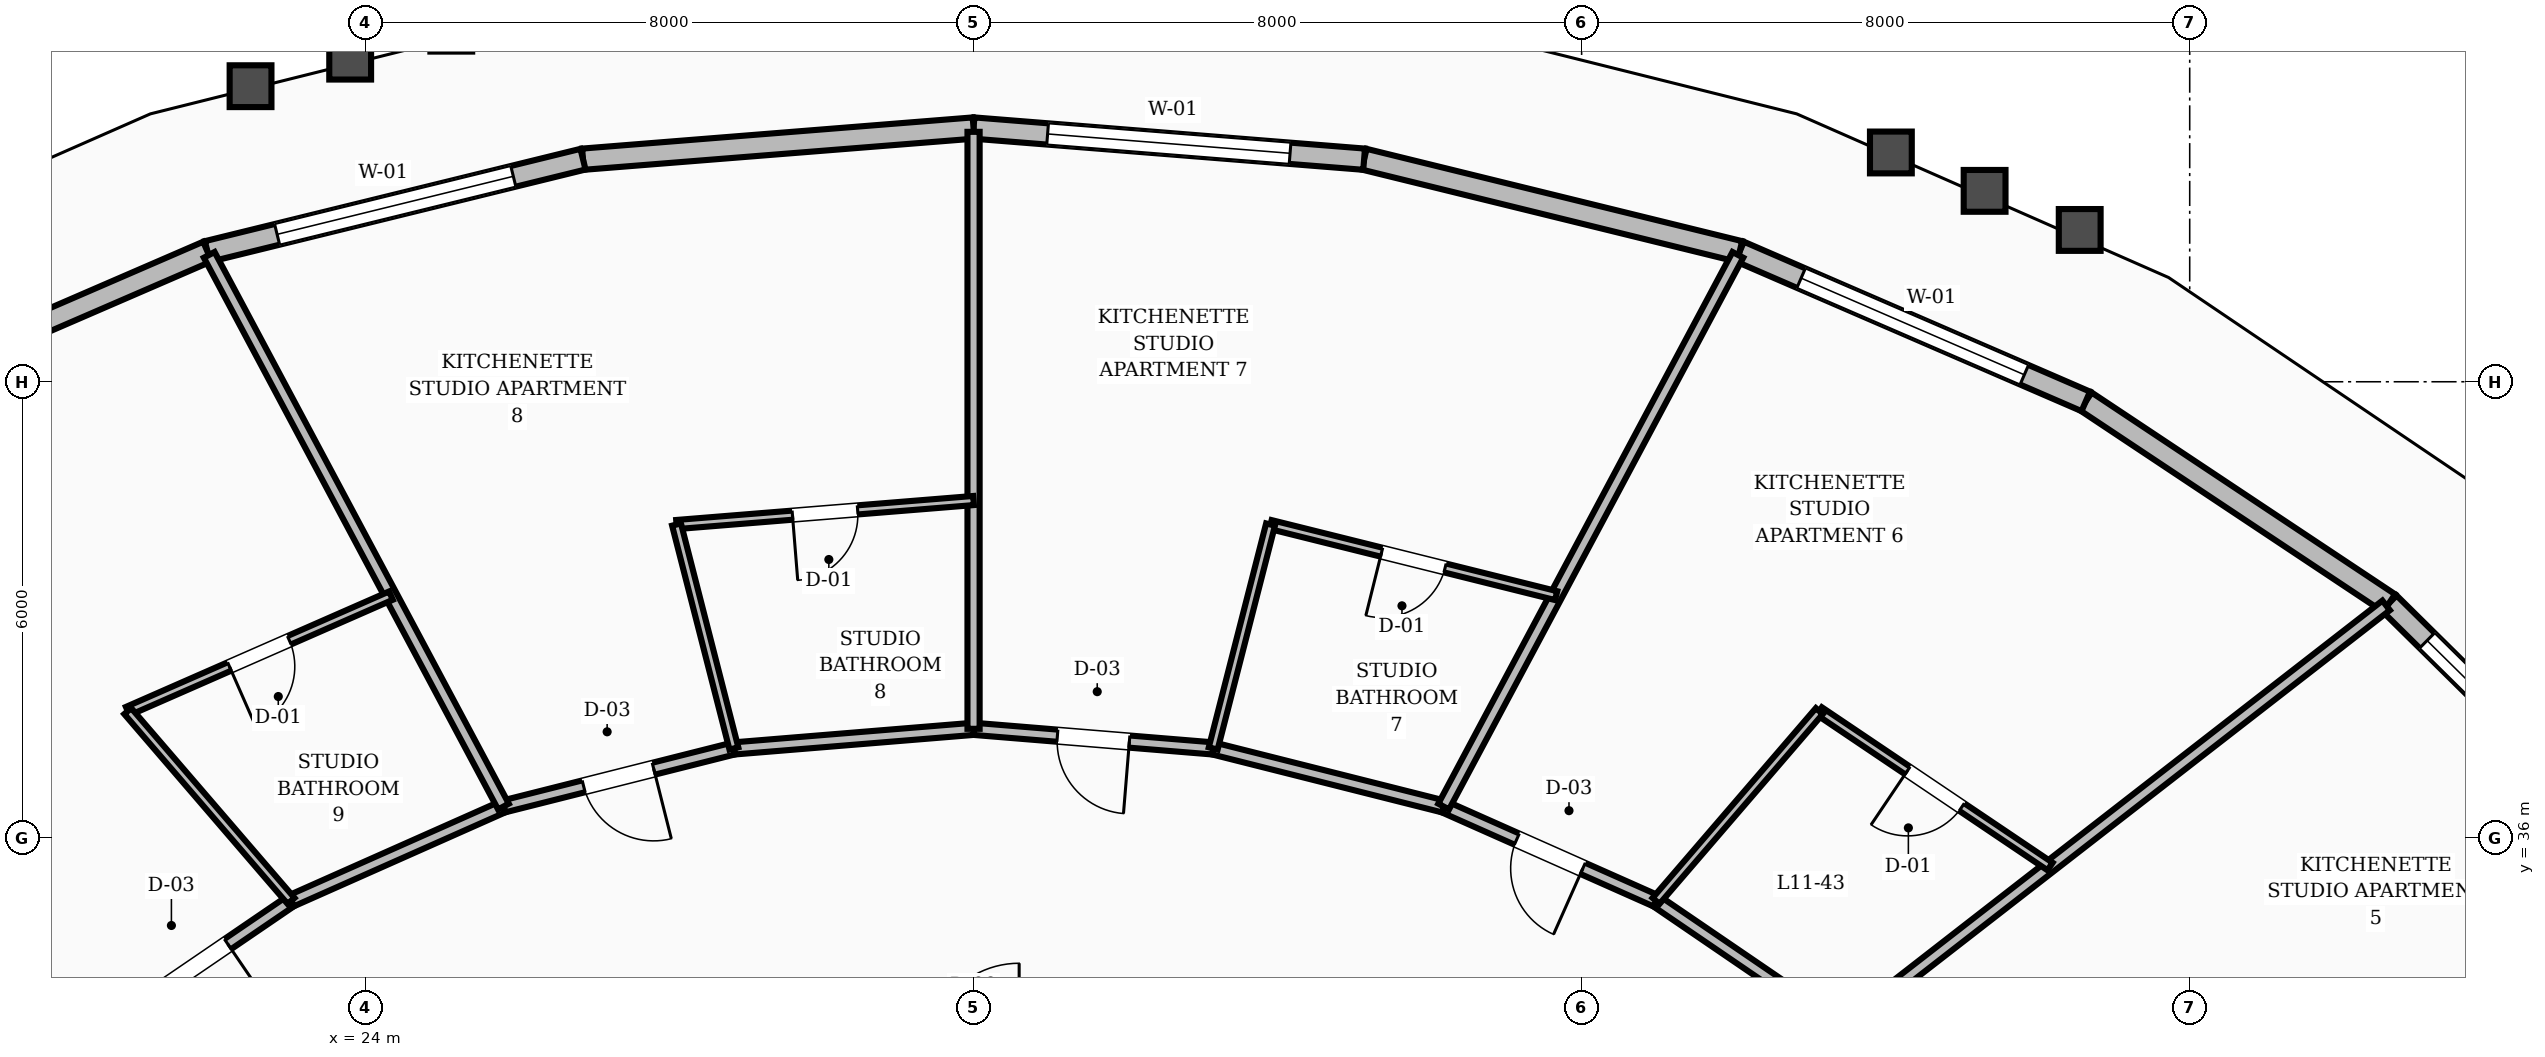
"""IFC4 building model, lengths in metres.
Left out: names, types, materials, properties, quantities, classifications, styles, units other than length and angle.
Written with IfcOpenShell. Run it as: python <this file> out.ifc"""

import sys

from ifc_helpers import new_model, si_unit, direction, frame, frame_2d, origin, place, context, subcontext, project, spatial, rectangle, extrude, element, fill, save


model = new_model("IFC4")
c1 = context("Model", 3, precision=1e-05, world=origin(), true_north=direction((0.0, 1.0)))
c2 = subcontext(c1, "Body", "Model", "MODEL_VIEW")
j1 = project(units=[si_unit("LENGTHUNIT", "METRE"), si_unit("PLANEANGLEUNIT", "RADIAN")], contexts=[c1])
p1 = place(None, origin())
s1 = spatial("IfcSite", under=j1, at=p1, CompositionType="ELEMENT")
p2 = place(p1, origin())
s2 = spatial("IfcBuilding", under=s1, at=p2, CompositionType="ELEMENT")
p3 = place(p2, frame((0.0, 0.0, 48.4)))
s3 = spatial("IfcBuildingStorey", under=s2, at=p3, CompositionType="ELEMENT", Elevation=48.4)
p4 = place(p3, frame((53.899, 35.855, 0.0), z_axis=(0.0, 0.0, 1.0), x_axis=(-0.711653949878, 0.70253018129, 0.0)))
e1 = element("IfcWall", 1, at=p4, inside=s3, PredefinedType="STANDARD", context=c2, shape_type="SweptSolid", body=[
    extrude(rectangle(XDim=4.603, YDim=0.28, at=frame_2d((2.301, 0.0))), origin(), (0.0, 0.0, 1.0), 2.65),
])
p5 = place(p4, frame((0.701, 0.0, 0.8)))
e2 = element("IfcOpeningElement", 2, at=p5, cuts=e1, PredefinedType="OPENING", context=c2, shape_type="SweptSolid", body=[
    extrude(rectangle(XDim=3.2, YDim=1.65, at=frame_2d((1.6, 0.825))), frame((0.0, 0.15, 0.0), z_axis=(0.0, -1.0, 0.0), x_axis=(1.0, 0.0, 0.0)), (0.0, 0.0, 1.0), 0.3),
])
p6 = place(p3, frame((50.624, 39.088, 0.0), z_axis=(0.0, 0.0, 1.0), x_axis=(-0.832723620408, 0.55368887655, 0.0)))
e3 = element("IfcWall", 3, at=p6, inside=s3, PredefinedType="STANDARD", context=c2, shape_type="SweptSolid", body=[
    extrude(rectangle(XDim=4.793, YDim=0.28, at=frame_2d((2.396, 0.0))), origin(), (0.0, 0.0, 1.0), 2.65),
])
p7 = place(p3, frame((46.633, 41.742, 0.0), z_axis=(0.0, 0.0, 1.0), x_axis=(-0.917665086661, 0.397354739149, 0.0)))
e4 = element("IfcWall", 4, at=p7, inside=s3, PredefinedType="STANDARD", context=c2, shape_type="SweptSolid", body=[
    extrude(rectangle(XDim=4.962, YDim=0.28, at=frame_2d((2.481, 0.0))), origin(), (0.0, 0.0, 1.0), 2.65),
])
p8 = place(p7, frame((0.881, 0.0, 0.8)))
e5 = element("IfcOpeningElement", 5, at=p8, cuts=e4, PredefinedType="OPENING", context=c2, shape_type="SweptSolid", body=[
    extrude(rectangle(XDim=3.2, YDim=1.65, at=frame_2d((1.6, 0.825))), frame((0.0, 0.15, 0.0), z_axis=(0.0, -1.0, 0.0), x_axis=(1.0, 0.0, 0.0)), (0.0, 0.0, 1.0), 0.3),
])
p9 = place(p3, frame((42.079, 43.714, 0.0), z_axis=(0.0, 0.0, 1.0), x_axis=(-0.971100140987, 0.238672403462, 0.0)))
e6 = element("IfcWall", 6, at=p9, inside=s3, PredefinedType="STANDARD", context=c2, shape_type="SweptSolid", body=[
    extrude(rectangle(XDim=5.088, YDim=0.28, at=frame_2d((2.544, 0.0))), origin(), (0.0, 0.0, 1.0), 2.65),
])
p10 = place(p3, frame((37.138, 44.928, 0.0), z_axis=(0.0, 0.0, 1.0), x_axis=(-0.996832874693, 0.079524964203, 0.0)))
e7 = element("IfcWall", 7, at=p10, inside=s3, PredefinedType="STANDARD", context=c2, shape_type="SweptSolid", body=[
    extrude(rectangle(XDim=5.155, YDim=0.28, at=frame_2d((2.577, 0.0))), origin(), (0.0, 0.0, 1.0), 2.65),
])
p11 = place(p10, frame((0.977, 0.0, 0.8)))
e8 = element("IfcOpeningElement", 8, at=p11, cuts=e7, PredefinedType="OPENING", context=c2, shape_type="SweptSolid", body=[
    extrude(rectangle(XDim=3.2, YDim=1.65, at=frame_2d((1.6, 0.825))), frame((0.0, 0.15, 0.0), z_axis=(0.0, -1.0, 0.0), x_axis=(1.0, 0.0, 0.0)), (0.0, 0.0, 1.0), 0.3),
])
p12 = place(p3, frame((32.0, 45.338, 0.0), z_axis=(0.0, 0.0, 1.0), x_axis=(-0.996832874693, -0.079524964203, 0.0)))
e9 = element("IfcWall", 9, at=p12, inside=s3, PredefinedType="STANDARD", context=c2, shape_type="SweptSolid", body=[
    extrude(rectangle(XDim=5.155, YDim=0.28, at=frame_2d((2.577, 0.0))), origin(), (0.0, 0.0, 1.0), 2.65),
])
p13 = place(p3, frame((26.862, 44.928, 0.0), z_axis=(0.0, 0.0, 1.0), x_axis=(-0.971100140987, -0.238672403462, 0.0)))
e10 = element("IfcWall", 10, at=p13, inside=s3, PredefinedType="STANDARD", context=c2, shape_type="SweptSolid", body=[
    extrude(rectangle(XDim=5.088, YDim=0.28, at=frame_2d((2.544, 0.0))), origin(), (0.0, 0.0, 1.0), 2.65),
])
p14 = place(p13, frame((0.944, 0.0, 0.8)))
e11 = element("IfcOpeningElement", 11, at=p14, cuts=e10, PredefinedType="OPENING", context=c2, shape_type="SweptSolid", body=[
    extrude(rectangle(XDim=3.2, YDim=1.65, at=frame_2d((1.6, 0.825))), frame((0.0, 0.15, 0.0), z_axis=(0.0, -1.0, 0.0), x_axis=(1.0, 0.0, 0.0)), (0.0, 0.0, 1.0), 0.3),
])
p15 = place(p3, frame((21.921, 43.714, 0.0), z_axis=(0.0, 0.0, 1.0), x_axis=(-0.917665086661, -0.397354739149, 0.0)))
e12 = element("IfcWall", 12, at=p15, inside=s3, PredefinedType="STANDARD", context=c2, shape_type="SweptSolid", body=[
    extrude(rectangle(XDim=4.962, YDim=0.28, at=frame_2d((2.481, 0.0))), origin(), (0.0, 0.0, 1.0), 2.65),
])
p16 = place(p3, frame((43.428, 33.499, 0.0), z_axis=(0.0, 0.0, 1.0), x_axis=(-0.826112340767, 0.563505457323, 0.0)))
e13 = element("IfcWall", 13, at=p16, inside=s3, PredefinedType="SOLIDWALL", context=c2, shape_type="SweptSolid", body=[
    extrude(rectangle(XDim=2.965, YDim=0.16, at=frame_2d((1.482, 0.0))), origin(), (0.0, 0.0, 1.0), 2.61),
])
p17 = place(p3, frame((40.979, 35.17, 0.0), z_axis=(0.0, 0.0, 1.0), x_axis=(-0.913860932409, 0.406027334321, 0.0)))
e14 = element("IfcWall", 14, at=p17, inside=s3, PredefinedType="SOLIDWALL", context=c2, shape_type="SweptSolid", body=[
    extrude(rectangle(XDim=3.058, YDim=0.16, at=frame_2d((1.529, 0.0))), origin(), (0.0, 0.0, 1.0), 2.61),
])
p18 = place(p17, frame((1.054, 0.0, 0.0)))
e15 = element("IfcOpeningElement", 15, at=p18, cuts=e14, PredefinedType="OPENING", context=c2, shape_type="SweptSolid", body=[
    extrude(rectangle(XDim=0.95, YDim=2.1, at=frame_2d((0.475, 1.05))), frame((0.0, 0.09, 0.0), z_axis=(0.0, -1.0, 0.0), x_axis=(1.0, 0.0, 0.0)), (0.0, 0.0, 1.0), 0.18),
])
p19 = place(p3, frame((38.185, 36.411, 0.0), z_axis=(0.0, 0.0, 1.0), x_axis=(-0.969653665365, 0.244482656326, 0.0)))
e16 = element("IfcWall", 16, at=p19, inside=s3, PredefinedType="SOLIDWALL", context=c2, shape_type="SweptSolid", body=[
    extrude(rectangle(XDim=3.127, YDim=0.16, at=frame_2d((1.563, 0.0))), origin(), (0.0, 0.0, 1.0), 2.61),
])
p20 = place(p3, frame((35.153, 37.176, 0.0), z_axis=(0.0, 0.0, 1.0), x_axis=(-0.996661331307, 0.081646743207, 0.0)))
e17 = element("IfcWall", 17, at=p20, inside=s3, PredefinedType="SOLIDWALL", context=c2, shape_type="SweptSolid", body=[
    extrude(rectangle(XDim=3.164, YDim=0.16, at=frame_2d((1.582, 0.0))), origin(), (0.0, 0.0, 1.0), 2.61),
])
p21 = place(p20, frame((1.107, 0.0, 0.0)))
e18 = element("IfcOpeningElement", 18, at=p21, cuts=e17, PredefinedType="OPENING", context=c2, shape_type="SweptSolid", body=[
    extrude(rectangle(XDim=0.95, YDim=2.1, at=frame_2d((0.475, 1.05))), frame((0.0, 0.09, 0.0), z_axis=(0.0, -1.0, 0.0), x_axis=(1.0, 0.0, 0.0)), (0.0, 0.0, 1.0), 0.18),
])
p22 = place(p3, frame((32.0, 37.434, 0.0), z_axis=(0.0, 0.0, 1.0), x_axis=(-0.996661331307, -0.081646743207, 0.0)))
e19 = element("IfcWall", 19, at=p22, inside=s3, PredefinedType="SOLIDWALL", context=c2, shape_type="SweptSolid", body=[
    extrude(rectangle(XDim=3.164, YDim=0.16, at=frame_2d((1.582, 0.0))), origin(), (0.0, 0.0, 1.0), 2.61),
])
p23 = place(p3, frame((28.847, 37.176, 0.0), z_axis=(0.0, 0.0, 1.0), x_axis=(-0.969653665365, -0.244482656326, 0.0)))
e20 = element("IfcWall", 20, at=p23, inside=s3, PredefinedType="SOLIDWALL", context=c2, shape_type="SweptSolid", body=[
    extrude(rectangle(XDim=3.127, YDim=0.16, at=frame_2d((1.563, 0.0))), origin(), (0.0, 0.0, 1.0), 2.61),
])
p24 = place(p23, frame((1.088, 0.0, 0.0)))
e21 = element("IfcOpeningElement", 21, at=p24, cuts=e20, PredefinedType="OPENING", context=c2, shape_type="SweptSolid", body=[
    extrude(rectangle(XDim=0.95, YDim=2.1, at=frame_2d((0.475, 1.05))), frame((0.0, 0.09, 0.0), z_axis=(0.0, -1.0, 0.0), x_axis=(1.0, 0.0, 0.0)), (0.0, 0.0, 1.0), 0.18),
])
p25 = place(p3, frame((25.815, 36.411, 0.0), z_axis=(0.0, 0.0, 1.0), x_axis=(-0.913860932409, -0.406027334321, 0.0)))
e22 = element("IfcWall", 22, at=p25, inside=s3, PredefinedType="SOLIDWALL", context=c2, shape_type="SweptSolid", body=[
    extrude(rectangle(XDim=3.058, YDim=0.16, at=frame_2d((1.529, 0.0))), origin(), (0.0, 0.0, 1.0), 2.61),
])
p26 = place(p3, frame((23.021, 35.17, 0.0), z_axis=(0.0, 0.0, 1.0), x_axis=(-0.826112340767, -0.563505457323, 0.0)))
e23 = element("IfcWall", 23, at=p26, inside=s3, PredefinedType="SOLIDWALL", context=c2, shape_type="SweptSolid", body=[
    extrude(rectangle(XDim=2.965, YDim=0.16, at=frame_2d((1.482, 0.0))), origin(), (0.0, 0.0, 1.0), 2.61),
])
p27 = place(p26, frame((1.007, 0.0, 0.0)))
e24 = element("IfcOpeningElement", 24, at=p27, cuts=e23, PredefinedType="OPENING", context=c2, shape_type="SweptSolid", body=[
    extrude(rectangle(XDim=0.95, YDim=2.1, at=frame_2d((0.475, 1.05))), frame((0.0, 0.09, 0.0), z_axis=(0.0, -1.0, 0.0), x_axis=(1.0, 0.0, 0.0)), (0.0, 0.0, 1.0), 0.18),
])
p28 = place(p3, frame((43.428, 33.499, 0.0), z_axis=(0.0, 0.0, 1.0), x_axis=(0.789749576514, 0.613429381751, 0.0)))
e25 = element("IfcWall", 25, at=p28, inside=s3, PredefinedType="SOLIDWALL", context=c2, shape_type="SweptSolid", body=[
    extrude(rectangle(XDim=9.061, YDim=0.16, at=frame_2d((4.531, 0.0))), origin(), (0.0, 0.0, 1.0), 2.61),
])
p29 = place(p3, frame((46.163, 35.623, 0.0), z_axis=(0.0, 0.0, 1.0), x_axis=(-0.829423679088, 0.558620050274, 0.0)))
e26 = element("IfcWall", 26, at=p29, inside=s3, PredefinedType="PARTITIONING", context=c2, shape_type="SweptSolid", body=[
    extrude(rectangle(XDim=3.659, YDim=0.12, at=frame_2d((1.83, 0.0))), origin(), (0.0, 0.0, 1.0), 2.61),
])
p30 = place(p29, frame((1.4, 0.0, 0.0)))
e27 = element("IfcOpeningElement", 27, at=p30, cuts=e26, PredefinedType="OPENING", context=c2, shape_type="SweptSolid", body=[
    extrude(rectangle(XDim=0.86, YDim=2.1, at=frame_2d((0.43, 1.05))), frame((0.0, 0.07, 0.0), z_axis=(0.0, -1.0, 0.0), x_axis=(1.0, 0.0, 0.0)), (0.0, 0.0, 1.0), 0.14),
])
p31 = place(p3, frame((40.979, 35.17, 0.0), z_axis=(0.0, 0.0, 1.0), x_axis=(0.652169620861, 0.758073074067, 0.0)))
e28 = element("IfcWall", 28, at=p31, inside=s3, PredefinedType="PARTITIONING", context=c2, shape_type="SweptSolid", body=[
    extrude(rectangle(XDim=3.294, YDim=0.12, at=frame_2d((1.647, 0.0))), origin(), (0.0, 0.0, 1.0), 2.61),
])
p32 = place(p3, frame((38.185, 36.411, 0.0), z_axis=(0.0, 0.0, 1.0), x_axis=(0.47056512842, 0.882365264454, 0.0)))
e29 = element("IfcWall", 29, at=p32, inside=s3, PredefinedType="SOLIDWALL", context=c2, shape_type="SweptSolid", body=[
    extrude(rectangle(XDim=8.226, YDim=0.16, at=frame_2d((4.113, 0.0))), origin(), (0.0, 0.0, 1.0), 2.61),
])
p33 = place(p3, frame((39.665, 39.186, 0.0), z_axis=(0.0, 0.0, 1.0), x_axis=(-0.970386800282, 0.241556324359, 0.0)))
e30 = element("IfcWall", 30, at=p33, inside=s3, PredefinedType="PARTITIONING", context=c2, shape_type="SweptSolid", body=[
    extrude(rectangle(XDim=3.872, YDim=0.12, at=frame_2d((1.936, 0.0))), origin(), (0.0, 0.0, 1.0), 2.61),
])
p34 = place(p33, frame((1.506, 0.0, 0.0)))
e31 = element("IfcOpeningElement", 31, at=p34, cuts=e30, PredefinedType="OPENING", context=c2, shape_type="SweptSolid", body=[
    extrude(rectangle(XDim=0.86, YDim=2.1, at=frame_2d((0.43, 1.05))), frame((0.0, 0.07, 0.0), z_axis=(0.0, -1.0, 0.0), x_axis=(1.0, 0.0, 0.0)), (0.0, 0.0, 1.0), 0.14),
])
p35 = place(p3, frame((35.153, 37.176, 0.0), z_axis=(0.0, 0.0, 1.0), x_axis=(0.248085594178, 0.968738116294, 0.0)))
e32 = element("IfcWall", 32, at=p35, inside=s3, PredefinedType="PARTITIONING", context=c2, shape_type="SweptSolid", body=[
    extrude(rectangle(XDim=3.041, YDim=0.12, at=frame_2d((1.521, 0.0))), origin(), (0.0, 0.0, 1.0), 2.61),
])
p36 = place(p3, frame((32.0, 37.434, 0.0), z_axis=(0.0, 0.0, 1.0), x_axis=(0.0, 1.0, 0.0)))
e33 = element("IfcWall", 33, at=p36, inside=s3, PredefinedType="SOLIDWALL", context=c2, shape_type="SweptSolid", body=[
    extrude(rectangle(XDim=7.854, YDim=0.16, at=frame_2d((3.927, 0.0))), origin(), (0.0, 0.0, 1.0), 2.61),
])
p37 = place(p3, frame((32.0, 40.438, 0.0), z_axis=(0.0, 0.0, 1.0), x_axis=(-0.996747596501, -0.080586778499, 0.0)))
e34 = element("IfcWall", 34, at=p37, inside=s3, PredefinedType="PARTITIONING", context=c2, shape_type="SweptSolid", body=[
    extrude(rectangle(XDim=3.92, YDim=0.12, at=frame_2d((1.96, 0.0))), origin(), (0.0, 0.0, 1.0), 2.61),
])
p38 = place(p37, frame((1.53, 0.0, 0.0)))
e35 = element("IfcOpeningElement", 35, at=p38, cuts=e34, PredefinedType="OPENING", context=c2, shape_type="SweptSolid", body=[
    extrude(rectangle(XDim=0.86, YDim=2.1, at=frame_2d((0.43, 1.05))), frame((0.0, 0.07, 0.0), z_axis=(0.0, -1.0, 0.0), x_axis=(1.0, 0.0, 0.0)), (0.0, 0.0, 1.0), 0.14),
])
p39 = place(p3, frame((28.847, 37.176, 0.0), z_axis=(0.0, 0.0, 1.0), x_axis=(-0.248085594178, 0.968738116294, 0.0)))
e36 = element("IfcWall", 36, at=p39, inside=s3, PredefinedType="PARTITIONING", context=c2, shape_type="SweptSolid", body=[
    extrude(rectangle(XDim=3.041, YDim=0.12, at=frame_2d((1.521, 0.0))), origin(), (0.0, 0.0, 1.0), 2.61),
])
p40 = place(p3, frame((25.815, 36.411, 0.0), z_axis=(0.0, 0.0, 1.0), x_axis=(-0.47056512842, 0.882365264454, 0.0)))
e37 = element("IfcWall", 37, at=p40, inside=s3, PredefinedType="SOLIDWALL", context=c2, shape_type="SweptSolid", body=[
    extrude(rectangle(XDim=8.226, YDim=0.16, at=frame_2d((4.113, 0.0))), origin(), (0.0, 0.0, 1.0), 2.61),
])
p41 = place(p3, frame((24.335, 39.186, 0.0), z_axis=(0.0, 0.0, 1.0), x_axis=(-0.915755288827, -0.401736544249, 0.0)))
e38 = element("IfcWall", 38, at=p41, inside=s3, PredefinedType="PARTITIONING", context=c2, shape_type="SweptSolid", body=[
    extrude(rectangle(XDim=3.781, YDim=0.12, at=frame_2d((1.891, 0.0))), origin(), (0.0, 0.0, 1.0), 2.61),
])
p42 = place(p41, frame((1.461, 0.0, 0.0)))
e39 = element("IfcOpeningElement", 39, at=p42, cuts=e38, PredefinedType="OPENING", context=c2, shape_type="SweptSolid", body=[
    extrude(rectangle(XDim=0.86, YDim=2.1, at=frame_2d((0.43, 1.05))), frame((0.0, 0.07, 0.0), z_axis=(0.0, -1.0, 0.0), x_axis=(1.0, 0.0, 0.0)), (0.0, 0.0, 1.0), 0.14),
])
p43 = place(p3, frame((23.021, 35.17, 0.0), z_axis=(0.0, 0.0, 1.0), x_axis=(-0.652169620861, 0.758073074067, 0.0)))
e40 = element("IfcWall", 40, at=p43, inside=s3, PredefinedType="PARTITIONING", context=c2, shape_type="SweptSolid", body=[
    extrude(rectangle(XDim=3.294, YDim=0.12, at=frame_2d((1.647, 0.0))), origin(), (0.0, 0.0, 1.0), 2.61),
])
p44 = place(p5, origin())
e41 = element("IfcWindow", 41, at=p44, inside=s3, PartitioningType="SINGLE_PANEL", PredefinedType="WINDOW", context=c2, shape_type="SweptSolid", body=[
    extrude(rectangle(XDim=3.2, YDim=1.65, at=frame_2d((1.6, 0.825))), frame((0.0, 0.03, 0.0), z_axis=(0.0, -1.0, 0.0), x_axis=(1.0, 0.0, 0.0)), (0.0, 0.0, 1.0), 0.06),
])
fill(e2, e41)
p45 = place(p8, origin())
e42 = element("IfcWindow", 42, at=p45, inside=s3, PartitioningType="SINGLE_PANEL", PredefinedType="WINDOW", context=c2, shape_type="SweptSolid", body=[
    extrude(rectangle(XDim=3.2, YDim=1.65, at=frame_2d((1.6, 0.825))), frame((0.0, 0.03, 0.0), z_axis=(0.0, -1.0, 0.0), x_axis=(1.0, 0.0, 0.0)), (0.0, 0.0, 1.0), 0.06),
])
fill(e5, e42)
p46 = place(p11, origin())
e43 = element("IfcWindow", 43, at=p46, inside=s3, PartitioningType="SINGLE_PANEL", PredefinedType="WINDOW", context=c2, shape_type="SweptSolid", body=[
    extrude(rectangle(XDim=3.2, YDim=1.65, at=frame_2d((1.6, 0.825))), frame((0.0, 0.03, 0.0), z_axis=(0.0, -1.0, 0.0), x_axis=(1.0, 0.0, 0.0)), (0.0, 0.0, 1.0), 0.06),
])
fill(e8, e43)
p47 = place(p14, origin())
e44 = element("IfcWindow", 44, at=p47, inside=s3, PartitioningType="SINGLE_PANEL", PredefinedType="WINDOW", context=c2, shape_type="SweptSolid", body=[
    extrude(rectangle(XDim=3.2, YDim=1.65, at=frame_2d((1.6, 0.825))), frame((0.0, 0.03, 0.0), z_axis=(0.0, -1.0, 0.0), x_axis=(1.0, 0.0, 0.0)), (0.0, 0.0, 1.0), 0.06),
])
fill(e11, e44)
p48 = place(p30, origin())
e45 = element("IfcDoor", 45, at=p48, inside=s3, OperationType="SINGLE_SWING_RIGHT", PredefinedType="DOOR", context=c2, shape_type="SweptSolid", body=[
    extrude(rectangle(XDim=0.86, YDim=2.1, at=frame_2d((0.43, 1.05))), frame((0.0, 0.025, 0.0), z_axis=(0.0, -1.0, 0.0), x_axis=(1.0, 0.0, 0.0)), (0.0, 0.0, 1.0), 0.05),
])
fill(e27, e45)
p49 = place(p18, origin())
e46 = element("IfcDoor", 46, at=p49, inside=s3, OperationType="SINGLE_SWING_LEFT", PredefinedType="DOOR", context=c2, shape_type="SweptSolid", body=[
    extrude(rectangle(XDim=0.95, YDim=2.1, at=frame_2d((0.475, 1.05))), frame((0.0, 0.025, 0.0), z_axis=(0.0, -1.0, 0.0), x_axis=(1.0, 0.0, 0.0)), (0.0, 0.0, 1.0), 0.05),
])
fill(e15, e46)
p50 = place(p34, origin())
e47 = element("IfcDoor", 47, at=p50, inside=s3, OperationType="SINGLE_SWING_RIGHT", PredefinedType="DOOR", context=c2, shape_type="SweptSolid", body=[
    extrude(rectangle(XDim=0.86, YDim=2.1, at=frame_2d((0.43, 1.05))), frame((0.0, 0.025, 0.0), z_axis=(0.0, -1.0, 0.0), x_axis=(1.0, 0.0, 0.0)), (0.0, 0.0, 1.0), 0.05),
])
fill(e31, e47)
p51 = place(p21, origin())
e48 = element("IfcDoor", 48, at=p51, inside=s3, OperationType="SINGLE_SWING_LEFT", PredefinedType="DOOR", context=c2, shape_type="SweptSolid", body=[
    extrude(rectangle(XDim=0.95, YDim=2.1, at=frame_2d((0.475, 1.05))), frame((0.0, 0.025, 0.0), z_axis=(0.0, -1.0, 0.0), x_axis=(1.0, 0.0, 0.0)), (0.0, 0.0, 1.0), 0.05),
])
fill(e18, e48)
p52 = place(p38, origin())
e49 = element("IfcDoor", 49, at=p52, inside=s3, OperationType="SINGLE_SWING_RIGHT", PredefinedType="DOOR", context=c2, shape_type="SweptSolid", body=[
    extrude(rectangle(XDim=0.86, YDim=2.1, at=frame_2d((0.43, 1.05))), frame((0.0, 0.025, 0.0), z_axis=(0.0, -1.0, 0.0), x_axis=(1.0, 0.0, 0.0)), (0.0, 0.0, 1.0), 0.05),
])
fill(e35, e49)
p53 = place(p24, origin())
e50 = element("IfcDoor", 50, at=p53, inside=s3, OperationType="SINGLE_SWING_LEFT", PredefinedType="DOOR", context=c2, shape_type="SweptSolid", body=[
    extrude(rectangle(XDim=0.95, YDim=2.1, at=frame_2d((0.475, 1.05))), frame((0.0, 0.025, 0.0), z_axis=(0.0, -1.0, 0.0), x_axis=(1.0, 0.0, 0.0)), (0.0, 0.0, 1.0), 0.05),
])
fill(e21, e50)
p54 = place(p42, origin())
e51 = element("IfcDoor", 51, at=p54, inside=s3, OperationType="SINGLE_SWING_RIGHT", PredefinedType="DOOR", context=c2, shape_type="SweptSolid", body=[
    extrude(rectangle(XDim=0.86, YDim=2.1, at=frame_2d((0.43, 1.05))), frame((0.0, 0.025, 0.0), z_axis=(0.0, -1.0, 0.0), x_axis=(1.0, 0.0, 0.0)), (0.0, 0.0, 1.0), 0.05),
])
fill(e39, e51)
p55 = place(p27, origin())
e52 = element("IfcDoor", 52, at=p55, inside=s3, OperationType="SINGLE_SWING_LEFT", PredefinedType="DOOR", context=c2, shape_type="SweptSolid", body=[
    extrude(rectangle(XDim=0.95, YDim=2.1, at=frame_2d((0.475, 1.05))), frame((0.0, 0.025, 0.0), z_axis=(0.0, -1.0, 0.0), x_axis=(1.0, 0.0, 0.0)), (0.0, 0.0, 1.0), 0.05),
])
fill(e24, e52)
save(model, sys.argv[1])
